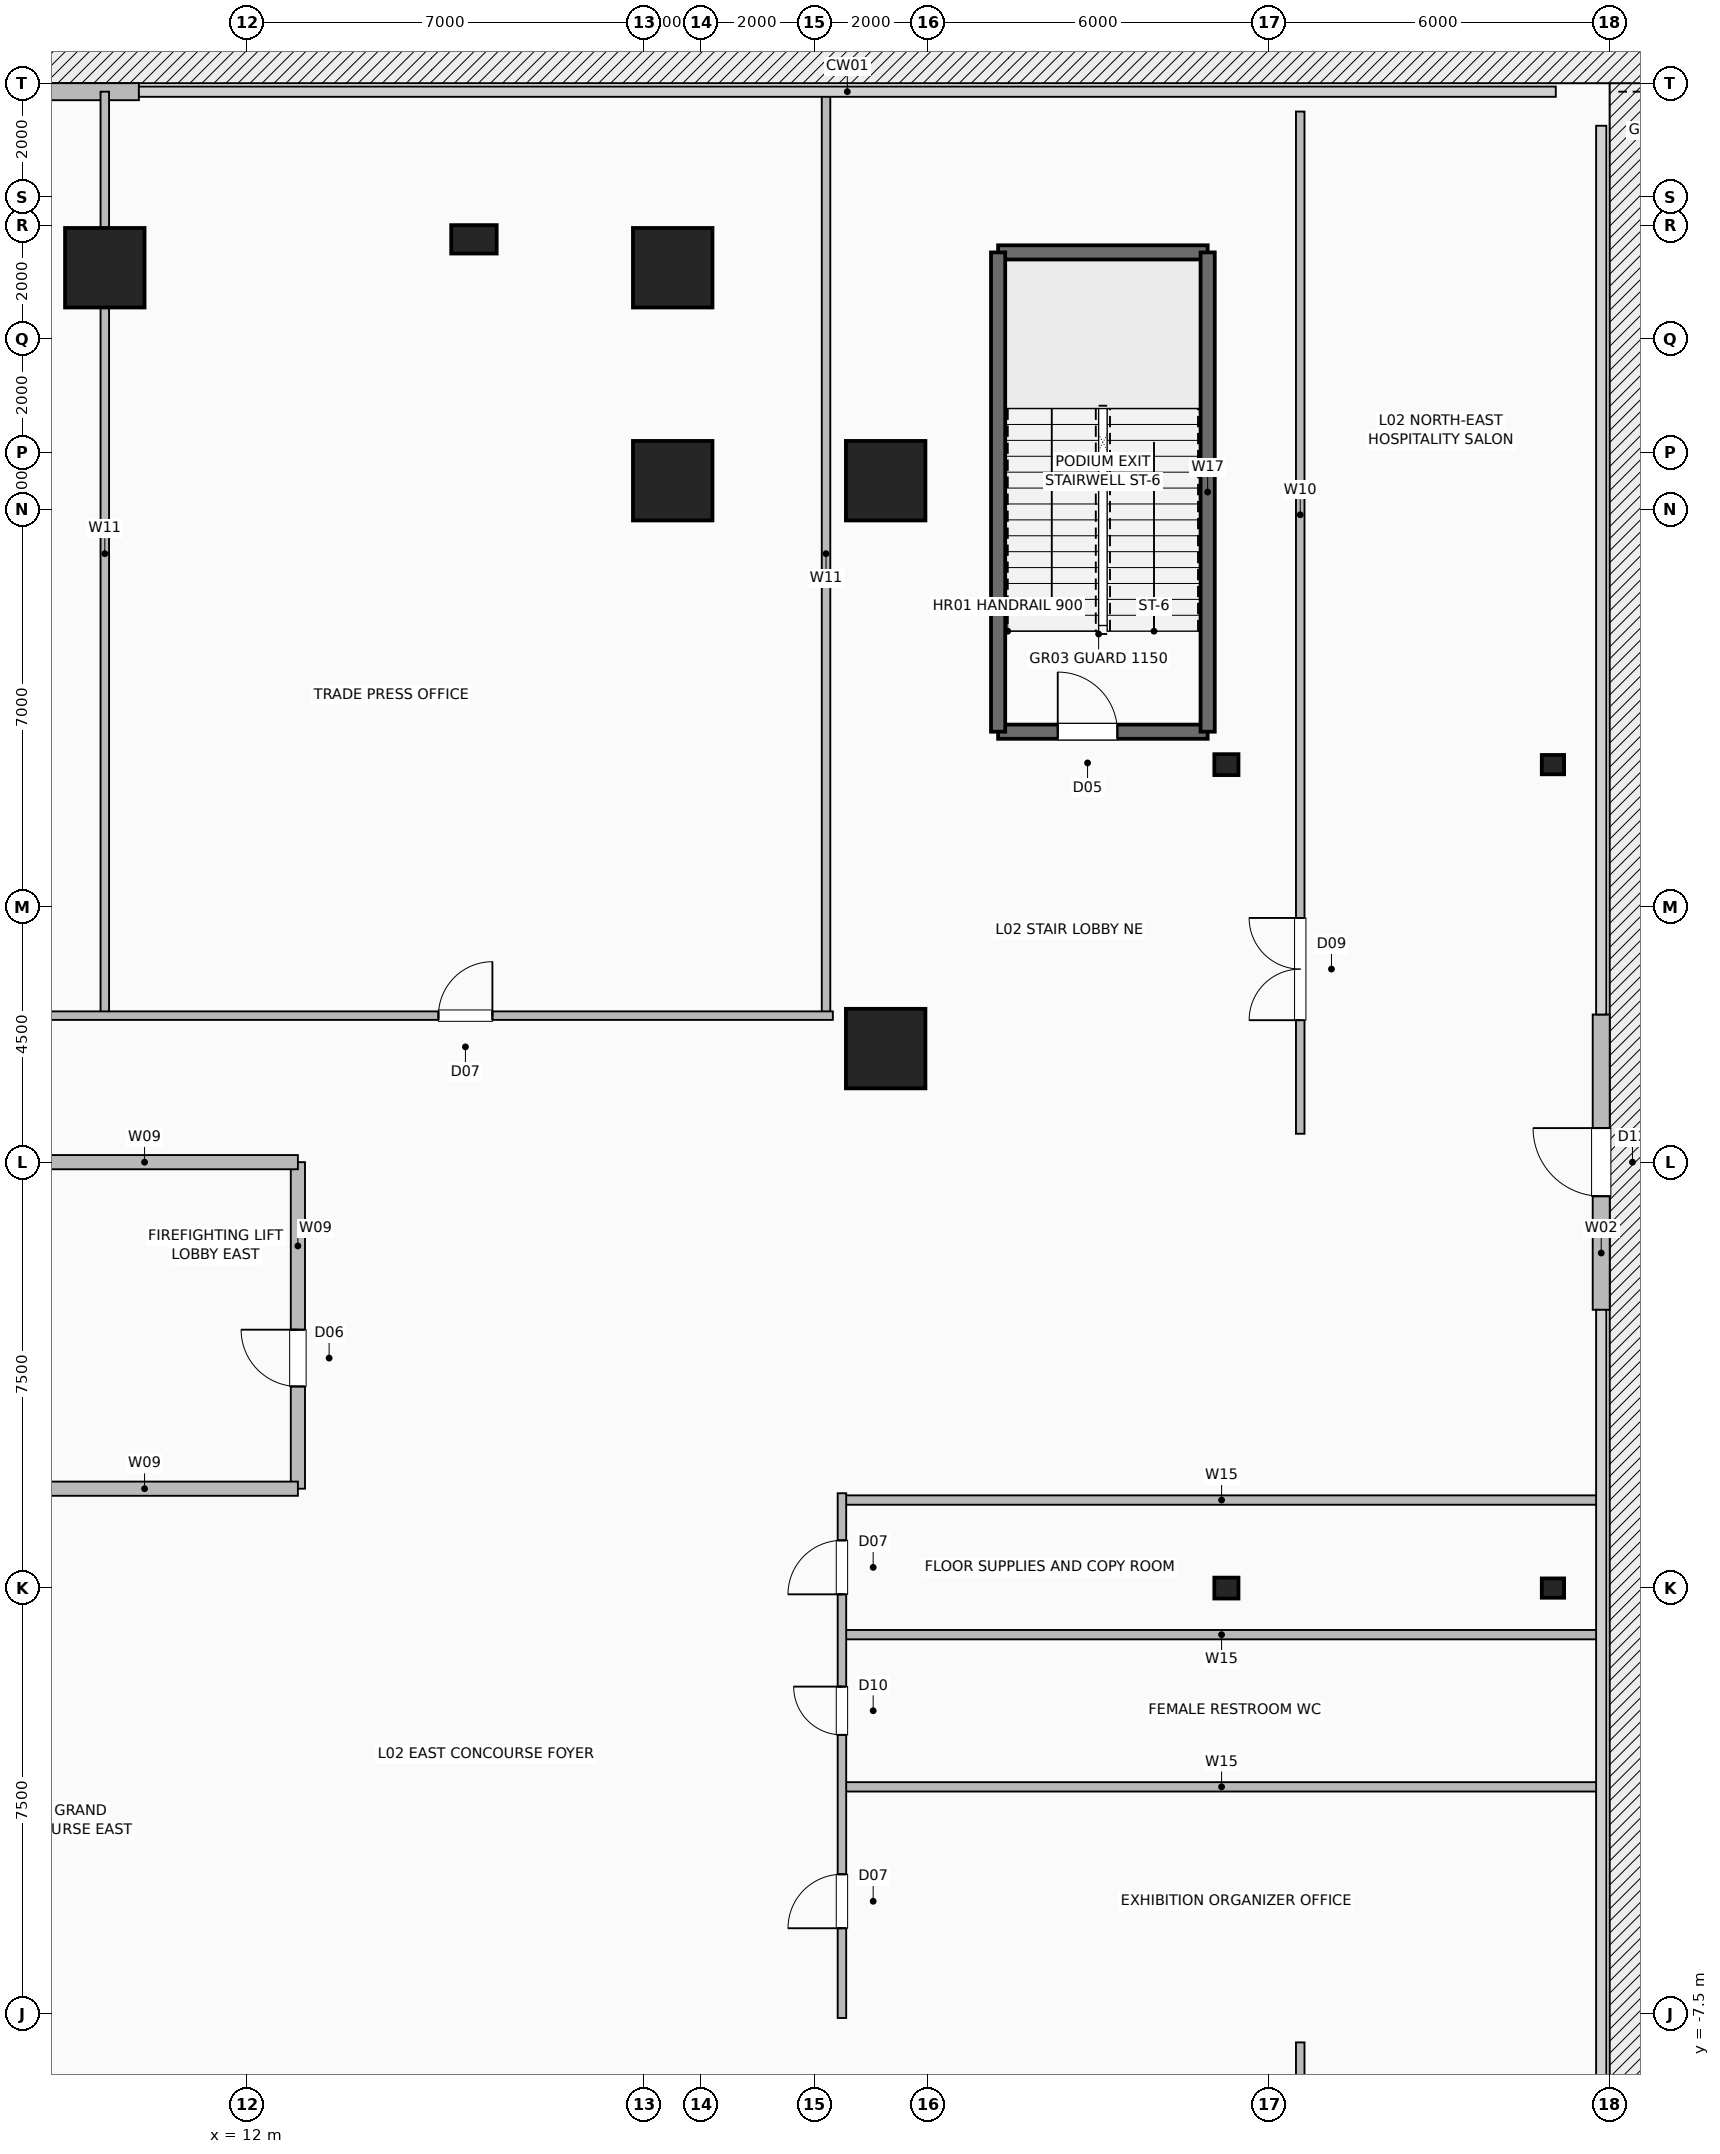
"""IFC4 building model, lengths in metres.
Left out: names, types, materials, properties, quantities, classifications, styles, units other than length and angle.
Written with IfcOpenShell. Run it as: python <this file> out.ifc"""

import sys

from ifc_helpers import new_model, si_unit, direction, frame, frame_2d, origin, origin_2d, place, context, subcontext, project, spatial, rectangle, hollow_rectangle, i_section, extrude, element, fill, save


model = new_model("IFC4")
c1 = context("Model", 3, precision=1e-05, world=origin(), true_north=direction((0.0, 1.0)))
c2 = subcontext(c1, "Body", "Model", "MODEL_VIEW")
j1 = project(units=[si_unit("LENGTHUNIT", "METRE"), si_unit("PLANEANGLEUNIT", "RADIAN")], contexts=[c1])
p1 = place(None, origin())
s1 = spatial("IfcSite", under=j1, at=p1, CompositionType="ELEMENT")
p2 = place(p1, origin())
s2 = spatial("IfcBuilding", under=s1, at=p2, CompositionType="ELEMENT")
p3 = place(p2, frame((0.0, 0.0, 10.8)))
s3 = spatial("IfcBuildingStorey", under=s2, at=p3, CompositionType="ELEMENT", Elevation=10.8)
for number, where, z_axis, x_axis in (
    (1, (9.5, 23.25, 0.0), (0.0, 0.0, 1.0), (1.0, 0.0, 0.0)),
    (2, (19.5, 23.25, 0.0), (0.0, 0.0, 1.0), (1.0, 0.0, 0.0)),
    (3, (23.25, 9.5, 0.0), (0.0, 0.0, 1.0), (1.0, 0.0, 0.0)),
    (4, (23.25, 19.5, 0.0), (0.0, 0.0, 1.0), (1.0, 0.0, 0.0)),
    (5, (19.5, 19.5, 0.0), (0.0, 0.0, 1.0), (1.0, 0.0, 0.0)),
):
    element("IfcColumn", number, at=place(p3, frame(where, z_axis=z_axis, x_axis=x_axis)), inside=s3, PredefinedType="COLUMN", context=c2, shape_type="SweptSolid", body=[
        extrude(hollow_rectangle(XDim=1.4, YDim=1.4, WallThickness=0.06, at=origin_2d()), origin(), (0.0, 0.0, 1.0), 5.4),
    ])
for number, where, z_axis, x_axis in (
    (6, (29.25, 0.0, 0.0), (0.0, 0.0, 1.0), (1.0, 0.0, 0.0)),
    (7, (29.25, 14.5, 0.0), (0.0, 0.0, 1.0), (1.0, 0.0, 0.0)),
):
    element("IfcColumn", number, at=place(p3, frame(where, z_axis=z_axis, x_axis=x_axis)), inside=s3, PredefinedType="COLUMN", context=c2, shape_type="SweptSolid", body=[
        extrude(i_section(OverallWidth=0.368, OverallDepth=0.425, WebThickness=0.03, FlangeThickness=0.048, FilletRadius=0.02, at=origin_2d()), origin(), (0.0, 0.0, 1.0), 5.4),
    ])
for number, where, z_axis, x_axis in (
    (8, (35.0, 0.0, -0.4), (0.0, 0.0, 1.0), (1.0, 0.0, 0.0)),
    (9, (35.0, 14.5, -0.4), (0.0, 0.0, 1.0), (1.0, 0.0, 0.0)),
):
    element("IfcColumn", number, at=place(p3, frame(where, z_axis=z_axis, x_axis=x_axis)), inside=s3, PredefinedType="COLUMN", context=c2, shape_type="SweptSolid", body=[
        extrude(i_section(OverallWidth=0.34, OverallDepth=0.393, WebThickness=0.02, FlangeThickness=0.033, FilletRadius=0.02, at=origin_2d()), origin(), (0.0, 0.0, 1.0), 5.4),
    ])
p4 = place(p3, frame((16.0, 23.75, 0.0), z_axis=(0.0, 0.0, 1.0), x_axis=(1.0, 0.0, 0.0)))
e10 = element("IfcColumn", 10, at=p4, inside=s3, PredefinedType="PILASTER", context=c2, shape_type="SweptSolid", body=[
    extrude(rectangle(XDim=0.5, YDim=0.8, at=origin_2d()), origin(), (0.0, 0.0, 1.0), 5.4),
])
p5 = place(p3, frame((35.85, 4.9, 0.0), z_axis=(0.0, 0.0, 1.0), x_axis=(0.0, 1.0, 0.0)))
e11 = element("IfcWall", 11, at=p5, inside=s3, PredefinedType="SOLIDWALL", context=c2, shape_type="SweptSolid", body=[
    extrude(rectangle(XDim=5.2, YDim=0.3, at=frame_2d((2.6, 0.0))), origin(), (0.0, 0.0, 1.0), 5.0),
])
p6 = place(p5, frame((2.0, 0.0, 0.0)))
e12 = element("IfcOpeningElement", 12, at=p6, cuts=e11, PredefinedType="OPENING", context=c2, shape_type="SweptSolid", body=[
    extrude(rectangle(XDim=1.2, YDim=2.25, at=frame_2d((0.6, 1.125))), frame((0.0, 0.16, 0.0), z_axis=(0.0, -1.0, 0.0), x_axis=(1.0, 0.0, 0.0)), (0.0, 0.0, 1.0), 0.32),
])
p7 = place(p3, frame((4.9, 26.35, 0.0), z_axis=(0.0, 0.0, 1.0), x_axis=(1.0, 0.0, 0.0)))
e13 = element("IfcWall", 13, at=p7, inside=s3, PredefinedType="SOLIDWALL", context=c2, shape_type="SweptSolid", body=[
    extrude(rectangle(XDim=5.2, YDim=0.3, at=frame_2d((2.6, 0.0))), origin(), (0.0, 0.0, 1.0), 5.0),
])
p8 = place(p7, frame((2.0, 0.0, 0.0)))
e14 = element("IfcOpeningElement", 14, at=p8, cuts=e13, PredefinedType="OPENING", context=c2, shape_type="SweptSolid", body=[
    extrude(rectangle(XDim=1.2, YDim=2.25, at=frame_2d((0.6, 1.125))), frame((0.0, 0.16, 0.0), z_axis=(0.0, -1.0, 0.0), x_axis=(1.0, 0.0, 0.0)), (0.0, 0.0, 1.0), 0.32),
])
p9 = place(p3, frame((25.23, 15.08, 0.0), z_axis=(0.0, 0.0, 1.0), x_axis=(1.0, 0.0, 0.0)))
e15 = element("IfcWall", 15, at=p9, inside=s3, PredefinedType="SHEAR", context=c2, shape_type="SweptSolid", body=[
    extrude(rectangle(XDim=3.69, YDim=0.25, at=frame_2d((1.845, 0.0))), origin(), (0.0, 0.0, 1.0), 5.0),
])
p10 = place(p9, frame((1.05, 0.0, 0.0)))
e16 = element("IfcOpeningElement", 16, at=p10, cuts=e15, PredefinedType="OPENING", context=c2, shape_type="SweptSolid", body=[
    extrude(rectangle(XDim=1.05, YDim=2.08, at=frame_2d((0.525, 1.04))), frame((0.0, 0.135, 0.0), z_axis=(0.0, -1.0, 0.0), x_axis=(1.0, 0.0, 0.0)), (0.0, 0.0, 1.0), 0.27),
])
p11 = place(p3, frame((25.23, 23.52, 0.0), z_axis=(0.0, 0.0, 1.0), x_axis=(1.0, 0.0, 0.0)))
e17 = element("IfcWall", 17, at=p11, inside=s3, PredefinedType="SHEAR", context=c2, shape_type="SweptSolid", body=[
    extrude(rectangle(XDim=3.69, YDim=0.25, at=frame_2d((1.845, 0.0))), origin(), (0.0, 0.0, 1.0), 5.0),
])
for number, where, z_axis, x_axis in (
    (18, (25.23, 15.08, 0.0), (0.0, 0.0, 1.0), (0.0, 1.0, 0.0)),
    (19, (28.92, 15.08, 0.0), (0.0, 0.0, 1.0), (0.0, 1.0, 0.0)),
):
    element("IfcWall", number, at=place(p3, frame(where, z_axis=z_axis, x_axis=x_axis)), inside=s3, PredefinedType="SHEAR", context=c2, shape_type="SweptSolid", body=[
        extrude(rectangle(XDim=8.44, YDim=0.25, at=frame_2d((4.22, 0.0))), origin(), (0.0, 0.0, 1.0), 5.0),
    ])
p12 = place(p3, frame((12.9, 1.75, 0.0), z_axis=(0.0, 0.0, 1.0), x_axis=(0.0, 1.0, 0.0)))
e20 = element("IfcWall", 20, at=p12, inside=s3, PredefinedType="SHEAR", context=c2, shape_type="SweptSolid", body=[
    extrude(rectangle(XDim=5.75, YDim=0.25, at=frame_2d((2.875, 0.0))), origin(), (0.0, 0.0, 1.0), 5.0),
])
p13 = place(p12, frame((1.8, 0.0, 0.0)))
e21 = element("IfcOpeningElement", 21, at=p13, cuts=e20, PredefinedType="OPENING", context=c2, shape_type="SweptSolid", body=[
    extrude(rectangle(XDim=1.0, YDim=2.08, at=frame_2d((0.5, 1.04))), frame((0.0, 0.135, 0.0), z_axis=(0.0, -1.0, 0.0), x_axis=(1.0, 0.0, 0.0)), (0.0, 0.0, 1.0), 0.27),
])
for number, where, z_axis, x_axis in (
    (22, (7.5, 1.75, 0.0), (0.0, 0.0, 1.0), (1.0, 0.0, 0.0)),
    (23, (7.5, 7.5, 0.0), (0.0, 0.0, 1.0), (1.0, 0.0, 0.0)),
):
    element("IfcWall", number, at=place(p3, frame(where, z_axis=z_axis, x_axis=x_axis)), inside=s3, PredefinedType="SHEAR", context=c2, shape_type="SweptSolid", body=[
        extrude(rectangle(XDim=5.4, YDim=0.25, at=frame_2d((2.7, 0.0))), origin(), (0.0, 0.0, 1.0), 5.0),
    ])
for number, where, z_axis, x_axis in (
    (24, (9.5, 10.08, 0.0), (0.0, 0.0, 1.0), (0.0, 1.0, 0.0)),
    (25, (22.2, 10.08, 0.0), (0.0, 0.0, 1.0), (0.0, 1.0, 0.0)),
):
    element("IfcWall", number, at=place(p3, frame(where, z_axis=z_axis, x_axis=x_axis)), inside=s3, PredefinedType="PARTITIONING", context=c2, shape_type="SweptSolid", body=[
        extrude(rectangle(XDim=16.27, YDim=0.15, at=frame_2d((8.135, 0.0))), origin(), (0.0, 0.0, 1.0), 5.0),
    ])
p14 = place(p3, frame((-22.32, 10.08, 0.0), z_axis=(0.0, 0.0, 1.0), x_axis=(1.0, 0.0, 0.0)))
e26 = element("IfcWall", 26, at=p14, inside=s3, PredefinedType="PARTITIONING", context=c2, shape_type="SweptSolid", body=[
    extrude(rectangle(XDim=44.64, YDim=0.15, at=frame_2d((22.32, 0.0))), origin(), (0.0, 0.0, 1.0), 5.0),
])
p15 = place(p14, frame((9.745, 0.0, 0.0)))
e27 = element("IfcOpeningElement", 27, at=p15, cuts=e26, PredefinedType="OPENING", context=c2, shape_type="SweptSolid", body=[
    extrude(rectangle(XDim=0.95, YDim=2.06, at=frame_2d((0.475, 1.03))), frame((0.0, 0.085, 0.0), z_axis=(0.0, -1.0, 0.0), x_axis=(1.0, 0.0, 0.0)), (0.0, 0.0, 1.0), 0.17),
])
p16 = place(p14, frame((25.17, 0.0, 0.0)))
e28 = element("IfcOpeningElement", 28, at=p16, cuts=e26, PredefinedType="OPENING", context=c2, shape_type="SweptSolid", body=[
    extrude(rectangle(XDim=1.8, YDim=2.08, at=frame_2d((0.9, 1.04))), frame((0.0, 0.085, 0.0), z_axis=(0.0, -1.0, 0.0), x_axis=(1.0, 0.0, 0.0)), (0.0, 0.0, 1.0), 0.17),
])
p17 = place(p14, frame((37.695, 0.0, 0.0)))
e29 = element("IfcOpeningElement", 29, at=p17, cuts=e26, PredefinedType="OPENING", context=c2, shape_type="SweptSolid", body=[
    extrude(rectangle(XDim=0.95, YDim=2.06, at=frame_2d((0.475, 1.03))), frame((0.0, 0.085, 0.0), z_axis=(0.0, -1.0, 0.0), x_axis=(1.0, 0.0, 0.0)), (0.0, 0.0, 1.0), 0.17),
])
for number, where, z_axis, x_axis in (
    (30, (22.48, -0.82, 0.0), (0.0, 0.0, 1.0), (1.0, 0.0, 0.0)),
    (31, (22.48, -3.5, 0.0), (0.0, 0.0, 1.0), (1.0, 0.0, 0.0)),
    (32, (22.48, 1.55, 0.0), (0.0, 0.0, 1.0), (1.0, 0.0, 0.0)),
):
    element("IfcWall", number, at=place(p3, frame(where, z_axis=z_axis, x_axis=x_axis)), inside=s3, PredefinedType="PLUMBINGWALL", context=c2, shape_type="SweptSolid", body=[
        extrude(rectangle(XDim=13.37, YDim=0.165, at=frame_2d((6.685, 0.0))), origin(), (0.0, 0.0, 1.0), 5.0),
    ])
p18 = place(p3, frame((22.48, -7.57, 0.0), z_axis=(0.0, 0.0, 1.0), x_axis=(0.0, 1.0, 0.0)))
e33 = element("IfcWall", 33, at=p18, inside=s3, PredefinedType="PARTITIONING", context=c2, shape_type="SweptSolid", body=[
    extrude(rectangle(XDim=9.24, YDim=0.15, at=frame_2d((4.62, 0.0))), origin(), (0.0, 0.0, 1.0), 5.0),
])
p19 = place(p18, frame((1.58, 0.0, 0.0)))
e34 = element("IfcOpeningElement", 34, at=p19, cuts=e33, PredefinedType="OPENING", context=c2, shape_type="SweptSolid", body=[
    extrude(rectangle(XDim=0.95, YDim=2.06, at=frame_2d((0.475, 1.03))), frame((0.0, 0.085, 0.0), z_axis=(0.0, -1.0, 0.0), x_axis=(1.0, 0.0, 0.0)), (0.0, 0.0, 1.0), 0.17),
])
p20 = place(p18, frame((4.985, 0.0, 0.0)))
e35 = element("IfcOpeningElement", 35, at=p20, cuts=e33, PredefinedType="OPENING", context=c2, shape_type="SweptSolid", body=[
    extrude(rectangle(XDim=0.85, YDim=2.05, at=frame_2d((0.425, 1.025))), frame((0.0, 0.085, 0.0), z_axis=(0.0, -1.0, 0.0), x_axis=(1.0, 0.0, 0.0)), (0.0, 0.0, 1.0), 0.17),
])
p21 = place(p18, frame((7.46, 0.0, 0.0)))
e36 = element("IfcOpeningElement", 36, at=p21, cuts=e33, PredefinedType="OPENING", context=c2, shape_type="SweptSolid", body=[
    extrude(rectangle(XDim=0.95, YDim=2.06, at=frame_2d((0.475, 1.03))), frame((0.0, 0.085, 0.0), z_axis=(0.0, -1.0, 0.0), x_axis=(1.0, 0.0, 0.0)), (0.0, 0.0, 1.0), 0.17),
])
p22 = place(p3, frame((30.55, -26.0, 0.0), z_axis=(0.0, 0.0, 1.0), x_axis=(0.0, 1.0, 0.0)))
e37 = element("IfcWall", 37, at=p22, inside=s3, PredefinedType="PARTITIONING", context=c2, shape_type="SweptSolid", body=[
    extrude(rectangle(XDim=18.0, YDim=0.15, at=frame_2d((9.0, 0.0))), origin(), (0.0, 0.0, 1.0), 5.0),
])
p23 = place(p22, frame((14.5, 0.0, 0.0)))
e38 = element("IfcOpeningElement", 38, at=p23, cuts=e37, PredefinedType="OPENING", context=c2, shape_type="SweptSolid", body=[
    extrude(rectangle(XDim=1.8, YDim=2.08, at=frame_2d((0.9, 1.04))), frame((0.0, 0.085, 0.0), z_axis=(0.0, -1.0, 0.0), x_axis=(1.0, 0.0, 0.0)), (0.0, 0.0, 1.0), 0.17),
])
p24 = place(p3, frame((30.55, 8.0, 0.0), z_axis=(0.0, 0.0, 1.0), x_axis=(0.0, 1.0, 0.0)))
e39 = element("IfcWall", 39, at=p24, inside=s3, PredefinedType="PARTITIONING", context=c2, shape_type="SweptSolid", body=[
    extrude(rectangle(XDim=18.0, YDim=0.15, at=frame_2d((9.0, 0.0))), origin(), (0.0, 0.0, 1.0), 5.0),
])
p25 = place(p24, frame((2.0, 0.0, 0.0)))
e40 = element("IfcOpeningElement", 40, at=p25, cuts=e39, PredefinedType="OPENING", context=c2, shape_type="SweptSolid", body=[
    extrude(rectangle(XDim=1.8, YDim=2.08, at=frame_2d((0.9, 1.04))), frame((0.0, 0.085, 0.0), z_axis=(0.0, -1.0, 0.0), x_axis=(1.0, 0.0, 0.0)), (0.0, 0.0, 1.0), 0.17),
])
p26 = place(p6, origin())
e41 = element("IfcDoor", 41, at=p26, inside=s3, OperationType="SINGLE_SWING_RIGHT", PredefinedType="DOOR", context=c2, shape_type="SweptSolid", body=[
    extrude(rectangle(XDim=1.2, YDim=2.25, at=frame_2d((0.6, 1.125))), frame((0.0, 0.025, 0.0), z_axis=(0.0, -1.0, 0.0), x_axis=(1.0, 0.0, 0.0)), (0.0, 0.0, 1.0), 0.05),
])
fill(e12, e41)
p27 = place(p10, origin())
e42 = element("IfcDoor", 42, at=p27, inside=s3, OperationType="SINGLE_SWING_LEFT", PredefinedType="DOOR", context=c2, shape_type="SweptSolid", body=[
    extrude(rectangle(XDim=1.05, YDim=2.08, at=frame_2d((0.525, 1.04))), frame((0.0, 0.025, 0.0), z_axis=(0.0, -1.0, 0.0), x_axis=(1.0, 0.0, 0.0)), (0.0, 0.0, 1.0), 0.05),
])
fill(e16, e42)
p28 = place(p13, origin())
e43 = element("IfcDoor", 43, at=p28, inside=s3, OperationType="SINGLE_SWING_RIGHT", PredefinedType="DOOR", context=c2, shape_type="SweptSolid", body=[
    extrude(rectangle(XDim=1.0, YDim=2.08, at=frame_2d((0.5, 1.04))), frame((0.0, 0.025, 0.0), z_axis=(0.0, -1.0, 0.0), x_axis=(1.0, 0.0, 0.0)), (0.0, 0.0, 1.0), 0.05),
])
fill(e21, e43)
p29 = place(p17, origin())
e44 = element("IfcDoor", 44, at=p29, inside=s3, OperationType="SINGLE_SWING_RIGHT", PredefinedType="DOOR", context=c2, shape_type="SweptSolid", body=[
    extrude(rectangle(XDim=0.95, YDim=2.06, at=frame_2d((0.475, 1.03))), frame((0.0, 0.025, 0.0), z_axis=(0.0, -1.0, 0.0), x_axis=(1.0, 0.0, 0.0)), (0.0, 0.0, 1.0), 0.05),
])
fill(e29, e44)
p30 = place(p19, origin())
e45 = element("IfcDoor", 45, at=p30, inside=s3, OperationType="SINGLE_SWING_LEFT", PredefinedType="DOOR", context=c2, shape_type="SweptSolid", body=[
    extrude(rectangle(XDim=0.95, YDim=2.06, at=frame_2d((0.475, 1.03))), frame((0.0, 0.025, 0.0), z_axis=(0.0, -1.0, 0.0), x_axis=(1.0, 0.0, 0.0)), (0.0, 0.0, 1.0), 0.05),
])
fill(e34, e45)
p31 = place(p20, origin())
e46 = element("IfcDoor", 46, at=p31, inside=s3, OperationType="SINGLE_SWING_RIGHT", PredefinedType="DOOR", context=c2, shape_type="SweptSolid", body=[
    extrude(rectangle(XDim=0.85, YDim=2.05, at=frame_2d((0.425, 1.025))), frame((0.0, 0.025, 0.0), z_axis=(0.0, -1.0, 0.0), x_axis=(1.0, 0.0, 0.0)), (0.0, 0.0, 1.0), 0.05),
])
fill(e35, e46)
p32 = place(p21, origin())
e47 = element("IfcDoor", 47, at=p32, inside=s3, OperationType="SINGLE_SWING_LEFT", PredefinedType="DOOR", context=c2, shape_type="SweptSolid", body=[
    extrude(rectangle(XDim=0.95, YDim=2.06, at=frame_2d((0.475, 1.03))), frame((0.0, 0.025, 0.0), z_axis=(0.0, -1.0, 0.0), x_axis=(1.0, 0.0, 0.0)), (0.0, 0.0, 1.0), 0.05),
])
fill(e36, e47)
p33 = place(p25, origin())
e48 = element("IfcDoor", 48, at=p33, inside=s3, OperationType="DOUBLE_DOOR_SINGLE_SWING", PredefinedType="DOOR", context=c2, shape_type="SweptSolid", body=[
    extrude(rectangle(XDim=1.8, YDim=2.08, at=frame_2d((0.9, 1.04))), frame((0.0, 0.025, 0.0), z_axis=(0.0, -1.0, 0.0), x_axis=(1.0, 0.0, 0.0)), (0.0, 0.0, 1.0), 0.05),
])
fill(e40, e48)
save(model, sys.argv[1])
